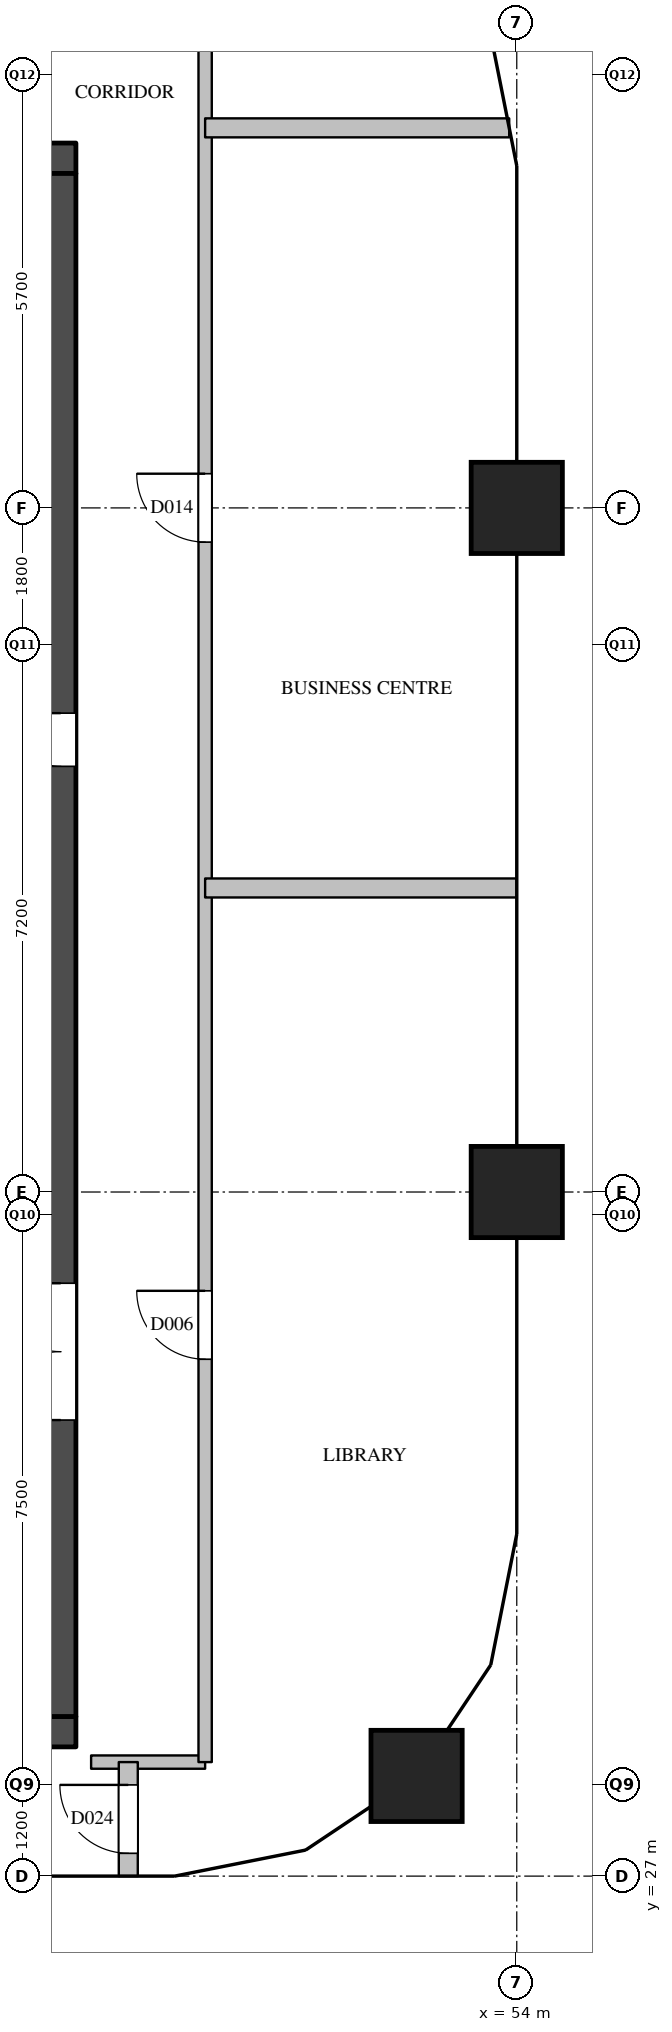
"""IFC4 building model, lengths in metres.
Left out: names, types, materials, properties, quantities, classifications, styles, units other than length and angle.
Written with IfcOpenShell. Run it as: python <this file> out.ifc"""

import sys

from ifc_helpers import new_model, si_unit, direction, frame, frame_2d, origin, origin_2d, place, context, subcontext, project, spatial, rectangle, extrude, element, fill, save


model = new_model("IFC4")
c1 = context("Model", 3, precision=1e-05, world=origin(), true_north=direction((0.0, 1.0)))
c2 = subcontext(c1, "Body", "Model", "MODEL_VIEW")
j1 = project(units=[si_unit("LENGTHUNIT", "METRE"), si_unit("PLANEANGLEUNIT", "RADIAN")], contexts=[c1])
p1 = place(None, origin())
s1 = spatial("IfcSite", under=j1, at=p1, CompositionType="ELEMENT")
p2 = place(p1, origin())
s2 = spatial("IfcBuilding", under=s1, at=p2, CompositionType="ELEMENT")
p3 = place(p2, frame((0.0, 0.0, 234.5)))
s3 = spatial("IfcBuildingStorey", under=s2, at=p3, CompositionType="ELEMENT", Elevation=234.5)
for number, where, z_axis, x_axis in (
    (1, (52.682, 28.318, 0.0), (0.0, 0.0, 1.0), (1.0, 0.0, 0.0)),
    (2, (54.0, 36.0, 0.0), (0.0, 0.0, 1.0), (1.0, 0.0, 0.0)),
    (3, (54.0, 45.0, 0.0), (0.0, 0.0, 1.0), (1.0, 0.0, 0.0)),
):
    element("IfcColumn", number, at=place(p3, frame(where, z_axis=z_axis, x_axis=x_axis)), inside=s3, PredefinedType="COLUMN", context=c2, shape_type="SweptSolid", body=[
        extrude(rectangle(XDim=1.2, YDim=1.2, at=origin_2d()), origin(), (0.0, 0.0, 1.0), 3.9),
    ])
p4 = place(p3, frame((36.2, 28.9, 0.0), z_axis=(0.0, 0.0, 1.0), x_axis=(1.0, 0.0, 0.0)))
e4 = element("IfcWall", 4, at=p4, inside=s3, PredefinedType="SHEAR", context=c2, shape_type="SweptSolid", body=[
    extrude(rectangle(XDim=12.0, YDim=0.4, at=frame_2d((6.0, 0.0))), origin(), (0.0, 0.0, 1.0), 3.6),
])
p5 = place(p4, frame((0.85, 0.0, 0.0)))
e5 = element("IfcOpeningElement", 5, at=p5, cuts=e4, PredefinedType="OPENING", context=c2, shape_type="SweptSolid", body=[
    extrude(rectangle(XDim=1.2, YDim=2.1, at=frame_2d((0.6, 1.05))), frame((0.0, 0.21, 0.0), z_axis=(0.0, -1.0, 0.0), x_axis=(1.0, 0.0, 0.0)), (0.0, 0.0, 1.0), 0.42),
])
p6 = place(p4, frame((2.95, 0.0, 0.0)))
e6 = element("IfcOpeningElement", 6, at=p6, cuts=e4, PredefinedType="OPENING", context=c2, shape_type="SweptSolid", body=[
    extrude(rectangle(XDim=1.2, YDim=2.1, at=frame_2d((0.6, 1.05))), frame((0.0, 0.21, 0.0), z_axis=(0.0, -1.0, 0.0), x_axis=(1.0, 0.0, 0.0)), (0.0, 0.0, 1.0), 0.42),
])
p7 = place(p4, frame((5.05, 0.0, 0.0)))
e7 = element("IfcOpeningElement", 7, at=p7, cuts=e4, PredefinedType="OPENING", context=c2, shape_type="SweptSolid", body=[
    extrude(rectangle(XDim=1.2, YDim=2.1, at=frame_2d((0.6, 1.05))), frame((0.0, 0.21, 0.0), z_axis=(0.0, -1.0, 0.0), x_axis=(1.0, 0.0, 0.0)), (0.0, 0.0, 1.0), 0.42),
])
p8 = place(p3, frame((36.2, 49.6, 0.0), z_axis=(0.0, 0.0, 1.0), x_axis=(1.0, 0.0, 0.0)))
e8 = element("IfcWall", 8, at=p8, inside=s3, PredefinedType="SHEAR", context=c2, shape_type="SweptSolid", body=[
    extrude(rectangle(XDim=12.0, YDim=0.4, at=frame_2d((6.0, 0.0))), origin(), (0.0, 0.0, 1.0), 3.6),
])
p9 = place(p3, frame((48.0, 29.1, 0.0), z_axis=(0.0, 0.0, 1.0), x_axis=(0.0, 1.0, 0.0)))
e9 = element("IfcWall", 9, at=p9, inside=s3, PredefinedType="SHEAR", context=c2, shape_type="SweptSolid", body=[
    extrude(rectangle(XDim=20.3, YDim=0.4, at=frame_2d((10.15, 0.0))), origin(), (0.0, 0.0, 1.0), 3.6),
])
p10 = place(p9, frame((12.5, 0.0, 0.0)))
e10 = element("IfcOpeningElement", 10, at=p10, cuts=e9, PredefinedType="OPENING", context=c2, shape_type="SweptSolid", body=[
    extrude(rectangle(XDim=0.7, YDim=2.1, at=frame_2d((0.35, 1.05))), frame((0.0, 0.21, 0.0), z_axis=(0.0, -1.0, 0.0), x_axis=(1.0, 0.0, 0.0)), (0.0, 0.0, 1.0), 0.42),
])
p11 = place(p9, frame((3.9, 0.0, 0.0)))
e11 = element("IfcOpeningElement", 11, at=p11, cuts=e9, PredefinedType="OPENING", context=c2, shape_type="SweptSolid", body=[
    extrude(rectangle(XDim=1.8, YDim=2.1, at=frame_2d((0.9, 1.05))), frame((0.0, 0.21, 0.0), z_axis=(0.0, -1.0, 0.0), x_axis=(1.0, 0.0, 0.0)), (0.0, 0.0, 1.0), 0.42),
])
p12 = place(p3, frame((48.4, 28.5, 0.0), z_axis=(0.0, 0.0, 1.0), x_axis=(1.0, 0.0, 0.0)))
e12 = element("IfcWall", 12, at=p12, inside=s3, PredefinedType="PARTITIONING", context=c2, shape_type="SweptSolid", body=[
    extrude(rectangle(XDim=1.5, YDim=0.175, at=frame_2d((0.75, 0.0))), origin(), (0.0, 0.0, 1.0), 3.6),
])
p13 = place(p3, frame((49.9, 28.5, 0.0), z_axis=(0.0, 0.0, 1.0), x_axis=(0.0, 1.0, 0.0)))
e13 = element("IfcWall", 13, at=p13, inside=s3, PredefinedType="PARTITIONING", context=c2, shape_type="SweptSolid", body=[
    extrude(rectangle(XDim=23.0, YDim=0.175, at=frame_2d((11.5, 0.0))), origin(), (0.0, 0.0, 1.0), 3.6),
])
p14 = place(p13, frame((5.3, 0.0, 0.0)))
e14 = element("IfcOpeningElement", 14, at=p14, cuts=e13, PredefinedType="OPENING", context=c2, shape_type="SweptSolid", body=[
    extrude(rectangle(XDim=0.9, YDim=2.1, at=frame_2d((0.45, 1.05))), frame((0.0, 0.097, 0.0), z_axis=(0.0, -1.0, 0.0), x_axis=(1.0, 0.0, 0.0)), (0.0, 0.0, 1.0), 0.195),
])
p15 = place(p13, frame((16.05, 0.0, 0.0)))
e15 = element("IfcOpeningElement", 15, at=p15, cuts=e13, PredefinedType="OPENING", context=c2, shape_type="SweptSolid", body=[
    extrude(rectangle(XDim=0.9, YDim=2.1, at=frame_2d((0.45, 1.05))), frame((0.0, 0.097, 0.0), z_axis=(0.0, -1.0, 0.0), x_axis=(1.0, 0.0, 0.0)), (0.0, 0.0, 1.0), 0.195),
])
p16 = place(p3, frame((49.9, 40.0, 0.0), z_axis=(0.0, 0.0, 1.0), x_axis=(1.0, 0.0, 0.0)))
e16 = element("IfcWall", 16, at=p16, inside=s3, PredefinedType="PARTITIONING", context=c2, shape_type="SweptSolid", body=[
    extrude(rectangle(XDim=4.1, YDim=0.25, at=frame_2d((2.05, 0.0))), origin(), (0.0, 0.0, 1.0), 2.6),
])
p17 = place(p3, frame((49.9, 50.0, 0.0), z_axis=(0.0, 0.0, 1.0), x_axis=(1.0, 0.0, 0.0)))
e17 = element("IfcWall", 17, at=p17, inside=s3, PredefinedType="PARTITIONING", context=c2, shape_type="SweptSolid", body=[
    extrude(rectangle(XDim=4.0, YDim=0.25, at=frame_2d((2.0, 0.0))), origin(), (0.0, 0.0, 1.0), 2.6),
])
p18 = place(p3, frame((48.889, 27.0, 0.0), z_axis=(0.0, 0.0, 1.0), x_axis=(0.0, 1.0, 0.0)))
e18 = element("IfcWall", 18, at=p18, inside=s3, PredefinedType="PARTITIONING", context=c2, shape_type="SweptSolid", body=[
    extrude(rectangle(XDim=1.5, YDim=0.25, at=frame_2d((0.75, 0.0))), origin(), (0.0, 0.0, 1.0), 2.6),
])
p19 = place(p18, frame((0.3, 0.0, 0.0)))
e19 = element("IfcOpeningElement", 19, at=p19, cuts=e18, PredefinedType="OPENING", context=c2, shape_type="SweptSolid", body=[
    extrude(rectangle(XDim=0.9, YDim=2.1, at=frame_2d((0.45, 1.05))), frame((0.0, 0.135, 0.0), z_axis=(0.0, -1.0, 0.0), x_axis=(1.0, 0.0, 0.0)), (0.0, 0.0, 1.0), 0.27),
])
p20 = place(p10, origin())
e20 = element("IfcDoor", 20, at=p20, inside=s3, OperationType="SINGLE_SWING_RIGHT", PredefinedType="DOOR", context=c2, shape_type="SweptSolid", body=[
    extrude(rectangle(XDim=0.7, YDim=2.1, at=frame_2d((0.35, 1.05))), frame((0.0, 0.025, 0.0), z_axis=(0.0, -1.0, 0.0), x_axis=(1.0, 0.0, 0.0)), (0.0, 0.0, 1.0), 0.05),
])
fill(e10, e20)
p21 = place(p11, origin())
e21 = element("IfcDoor", 21, at=p21, inside=s3, OperationType="DOUBLE_DOOR_SINGLE_SWING", PredefinedType="DOOR", context=c2, shape_type="SweptSolid", body=[
    extrude(rectangle(XDim=1.8, YDim=2.1, at=frame_2d((0.9, 1.05))), frame((0.0, 0.025, 0.0), z_axis=(0.0, -1.0, 0.0), x_axis=(1.0, 0.0, 0.0)), (0.0, 0.0, 1.0), 0.05),
])
fill(e11, e21)
p22 = place(p14, origin())
e22 = element("IfcDoor", 22, at=p22, inside=s3, OperationType="SINGLE_SWING_RIGHT", PredefinedType="DOOR", context=c2, shape_type="SweptSolid", body=[
    extrude(rectangle(XDim=0.9, YDim=2.1, at=frame_2d((0.45, 1.05))), frame((0.0, 0.025, 0.0), z_axis=(0.0, -1.0, 0.0), x_axis=(1.0, 0.0, 0.0)), (0.0, 0.0, 1.0), 0.05),
])
fill(e14, e22)
p23 = place(p15, origin())
e23 = element("IfcDoor", 23, at=p23, inside=s3, OperationType="SINGLE_SWING_RIGHT", PredefinedType="DOOR", context=c2, shape_type="SweptSolid", body=[
    extrude(rectangle(XDim=0.9, YDim=2.1, at=frame_2d((0.45, 1.05))), frame((0.0, 0.025, 0.0), z_axis=(0.0, -1.0, 0.0), x_axis=(1.0, 0.0, 0.0)), (0.0, 0.0, 1.0), 0.05),
])
fill(e15, e23)
p24 = place(p19, origin())
e24 = element("IfcDoor", 24, at=p24, inside=s3, OperationType="SINGLE_SWING_RIGHT", PredefinedType="DOOR", context=c2, shape_type="SweptSolid", body=[
    extrude(rectangle(XDim=0.9, YDim=2.1, at=frame_2d((0.45, 1.05))), frame((0.0, 0.025, 0.0), z_axis=(0.0, -1.0, 0.0), x_axis=(1.0, 0.0, 0.0)), (0.0, 0.0, 1.0), 0.05),
])
fill(e19, e24)
save(model, sys.argv[1])
